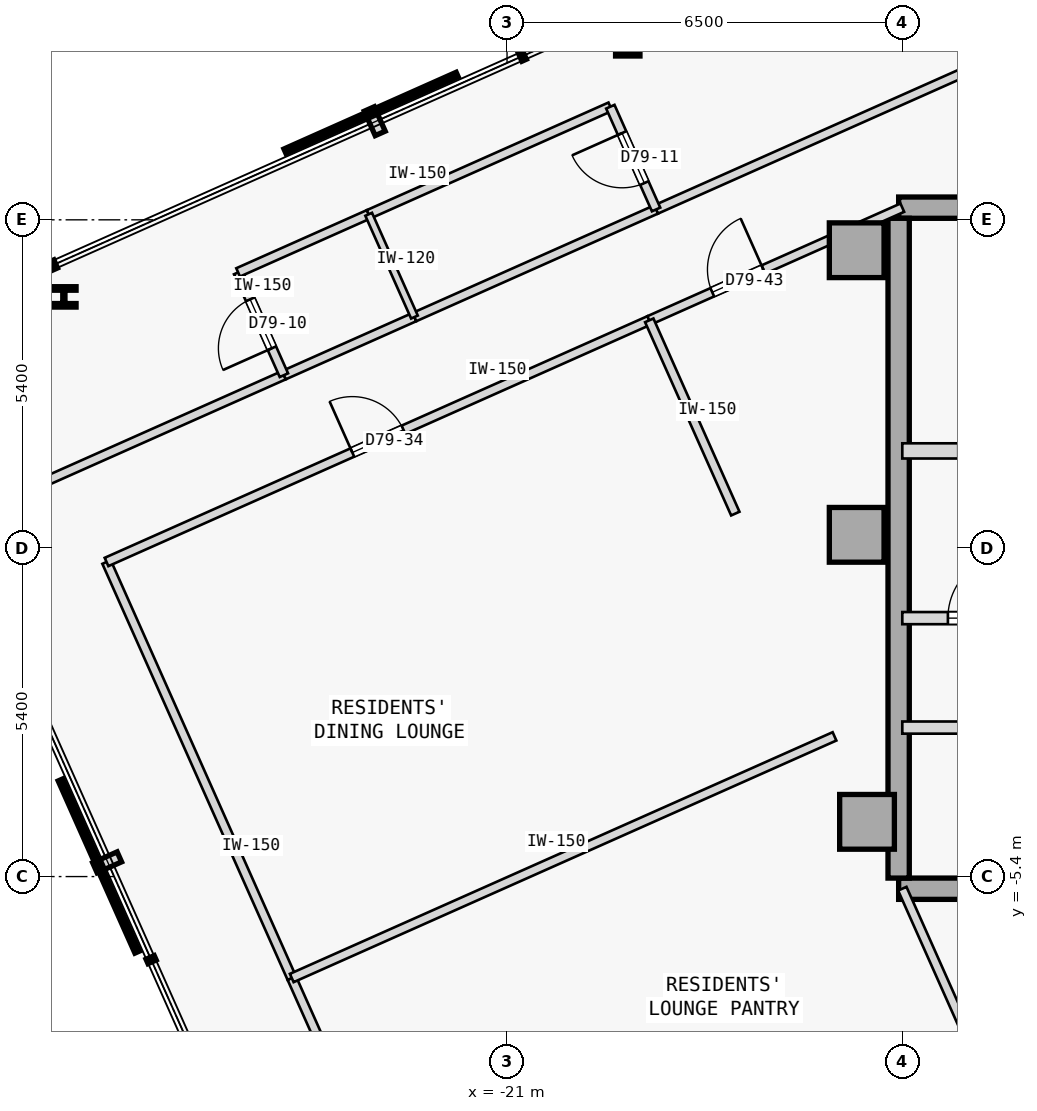
"""IFC4 building model, lengths in metres.
Left out: names, types, materials, properties, quantities, classifications, styles, units other than length and angle.
Written with IfcOpenShell. Run it as: python <this file> out.ifc"""

import sys

from ifc_helpers import new_model, si_unit, direction, frame, frame_2d, origin, origin_2d, place, context, subcontext, project, spatial, rectangle, i_section, extrude, element, fill, save


model = new_model("IFC4")
c1 = context("Model", 3, precision=1e-05, world=origin(), true_north=direction((0.0, 1.0)))
c2 = subcontext(c1, "Body", "Model", "MODEL_VIEW")
j1 = project(units=[si_unit("LENGTHUNIT", "METRE"), si_unit("PLANEANGLEUNIT", "RADIAN")], contexts=[c1])
p1 = place(None, origin())
s1 = spatial("IfcSite", under=j1, at=p1, CompositionType="ELEMENT")
p2 = place(p1, origin())
s2 = spatial("IfcBuilding", under=s1, at=p2, CompositionType="ELEMENT")
p3 = place(p2, frame((0.0, 0.0, 295.3)))
s3 = spatial("IfcBuildingStorey", under=s2, at=p3, CompositionType="ELEMENT", Elevation=295.3)
for number, where, z_axis, x_axis in (
    (1, (-15.25, 4.9, 0.0), (0.0, 0.0, 1.0), (1.0, 0.0, 0.0)),
    (2, (-15.25, 0.22, 0.0), (0.0, 0.0, 1.0), (1.0, 0.0, 0.0)),
    (3, (-15.08, -4.5, 0.0), (0.0, 0.0, 1.0), (1.0, 0.0, 0.0)),
):
    element("IfcColumn", number, at=place(p3, frame(where, z_axis=z_axis, x_axis=x_axis)), inside=s3, PredefinedType="COLUMN", context=c2, shape_type="SweptSolid", body=[
        extrude(rectangle(XDim=0.9, YDim=0.9, at=origin_2d()), origin(), (0.0, 0.0, 1.0), 3.35),
    ])
p4 = place(p3, frame((-14.56, 5.6, 0.0), z_axis=(0.0, 0.0, 1.0), x_axis=(1.0, 0.0, 0.0)))
e4 = element("IfcWall", 4, at=p4, inside=s3, PredefinedType="SHEAR", context=c2, shape_type="SweptSolid", body=[
    extrude(rectangle(XDim=11.41, YDim=0.35, at=frame_2d((5.705, 0.0))), origin(), (0.0, 0.0, 1.0), 3.125),
])
p5 = place(p3, frame((-14.56, -5.6, 0.0), z_axis=(0.0, 0.0, 1.0), x_axis=(1.0, 0.0, 0.0)))
e5 = element("IfcWall", 5, at=p5, inside=s3, PredefinedType="SHEAR", context=c2, shape_type="SweptSolid", body=[
    extrude(rectangle(XDim=10.86, YDim=0.35, at=frame_2d((5.43, 0.0))), origin(), (0.0, 0.0, 1.0), 3.125),
])
p6 = place(p3, frame((-14.56, -5.425, 0.0), z_axis=(0.0, 0.0, 1.0), x_axis=(0.0, 1.0, 0.0)))
e6 = element("IfcWall", 6, at=p6, inside=s3, PredefinedType="SHEAR", context=c2, shape_type="SweptSolid", body=[
    extrude(rectangle(XDim=10.85, YDim=0.35, at=frame_2d((5.425, 0.0))), origin(), (0.0, 0.0, 1.0), 3.125),
])
for number, where, z_axis, x_axis in (
    (7, (-19.015, 8.262, 0.0), (0.0, 0.0, 1.0), (1.0, 0.0, 0.0)),
    (8, (-28.288, 4.133, 0.0), (0.0, 0.0, 1.0), (1.0, 0.0, 0.0)),
):
    element("IfcColumn", number, at=place(p3, frame(where, z_axis=z_axis, x_axis=x_axis)), inside=s3, PredefinedType="COLUMN", context=c2, shape_type="SweptSolid", body=[
        extrude(i_section(OverallWidth=0.401, OverallDepth=0.335, WebThickness=0.036, FlangeThickness=0.058, FilletRadius=0.015, at=origin_2d()), origin(), (0.0, 0.0, 1.0), 3.35),
    ])
p7 = place(p3, frame((-14.5, 1.6, 0.0), z_axis=(0.0, 0.0, 1.0), x_axis=(1.0, 0.0, 0.0)))
e9 = element("IfcWall", 9, at=p7, inside=s3, PredefinedType="STANDARD", context=c2, shape_type="SweptSolid", body=[
    extrude(rectangle(XDim=3.6, YDim=0.25, at=frame_2d((1.8, 0.0))), origin(), (0.0, 0.0, 1.0), 3.125),
])
p8 = place(p7, frame((0.92, 0.0, 0.0)))
e10 = element("IfcOpeningElement", 10, at=p8, cuts=e9, PredefinedType="OPENING", context=c2, shape_type="SweptSolid", body=[
    extrude(rectangle(XDim=1.05, YDim=2.15, at=frame_2d((0.525, 1.075))), frame((0.0, 0.135, 0.0), z_axis=(0.0, -1.0, 0.0), x_axis=(1.0, 0.0, 0.0)), (0.0, 0.0, 1.0), 0.27),
])
p9 = place(p3, frame((-14.5, -1.15, 0.0), z_axis=(0.0, 0.0, 1.0), x_axis=(1.0, 0.0, 0.0)))
e11 = element("IfcWall", 11, at=p9, inside=s3, PredefinedType="STANDARD", context=c2, shape_type="SweptSolid", body=[
    extrude(rectangle(XDim=2.95, YDim=0.2, at=frame_2d((1.475, 0.0))), origin(), (0.0, 0.0, 1.0), 3.125),
])
p10 = place(p9, frame((0.75, 0.0, 0.0)))
e12 = element("IfcOpeningElement", 12, at=p10, cuts=e11, PredefinedType="OPENING", context=c2, shape_type="SweptSolid", body=[
    extrude(rectangle(XDim=1.05, YDim=2.18, at=frame_2d((0.525, 1.09))), frame((0.0, 0.11, 0.0), z_axis=(0.0, -1.0, 0.0), x_axis=(1.0, 0.0, 0.0)), (0.0, 0.0, 1.0), 0.22),
])
p11 = place(p3, frame((-14.5, -2.95, 0.0), z_axis=(0.0, 0.0, 1.0), x_axis=(1.0, 0.0, 0.0)))
e13 = element("IfcWall", 13, at=p11, inside=s3, PredefinedType="STANDARD", context=c2, shape_type="SweptSolid", body=[
    extrude(rectangle(XDim=10.8, YDim=0.2, at=frame_2d((5.4, 0.0))), origin(), (0.0, 0.0, 1.0), 3.125),
])
p12 = place(p11, frame((9.17, 0.0, 0.0)))
e14 = element("IfcOpeningElement", 14, at=p12, cuts=e13, PredefinedType="OPENING", context=c2, shape_type="SweptSolid", body=[
    extrude(rectangle(XDim=1.1, YDim=2.15, at=frame_2d((0.55, 1.075))), frame((0.0, 0.11, 0.0), z_axis=(0.0, -1.0, 0.0), x_axis=(1.0, 0.0, 0.0)), (0.0, 0.0, 1.0), 0.22),
])
p13 = place(p11, frame((2.33, 0.0, 0.0)))
e15 = element("IfcOpeningElement", 15, at=p13, cuts=e13, PredefinedType="OPENING", context=c2, shape_type="SweptSolid", body=[
    extrude(rectangle(XDim=0.92, YDim=2.15, at=frame_2d((0.46, 1.075))), frame((0.0, 0.11, 0.0), z_axis=(0.0, -1.0, 0.0), x_axis=(1.0, 0.0, 0.0)), (0.0, 0.0, 1.0), 0.22),
])
p14 = place(p11, frame((6.65, 0.0, 0.0)))
e16 = element("IfcOpeningElement", 16, at=p14, cuts=e13, PredefinedType="OPENING", context=c2, shape_type="SweptSolid", body=[
    extrude(rectangle(XDim=0.92, YDim=2.15, at=frame_2d((0.46, 1.075))), frame((0.0, 0.11, 0.0), z_axis=(0.0, -1.0, 0.0), x_axis=(1.0, 0.0, 0.0)), (0.0, 0.0, 1.0), 0.22),
])
p15 = place(p3, frame((-30.063, 0.444, 0.0), z_axis=(0.0, 0.0, 1.0), x_axis=(0.913545336501, 0.406736915165, 0.0)))
e17 = element("IfcWall", 17, at=p15, inside=s3, PredefinedType="PARTITIONING", context=c2, shape_type="SweptSolid", body=[
    extrude(rectangle(XDim=5.904, YDim=0.15, at=frame_2d((2.952, 0.0))), origin(), (0.0, 0.0, 1.0), 3.125),
])
p16 = place(p3, frame((-18.549, 5.57, 0.0), z_axis=(0.0, 0.0, 1.0), x_axis=(0.913545955058, 0.40673552586, 0.0)))
e18 = element("IfcWall", 18, at=p16, inside=s3, PredefinedType="PARTITIONING", context=c2, shape_type="SweptSolid", body=[
    extrude(rectangle(XDim=13.808, YDim=0.15, at=frame_2d((6.904, 0.0))), origin(), (0.0, 0.0, 1.0), 3.125),
])
p17 = place(p16, frame((6.429, 0.0, 0.0)))
e19 = element("IfcOpeningElement", 19, at=p17, cuts=e18, PredefinedType="OPENING", context=c2, shape_type="SweptSolid", body=[
    extrude(rectangle(XDim=0.95, YDim=2.15, at=frame_2d((0.475, 1.075))), frame((0.0, 0.085, 0.0), z_axis=(0.0, -1.0, 0.0), x_axis=(1.0, 0.0, 0.0)), (0.0, 0.0, 1.0), 0.17),
])
p18 = place(p3, frame((-24.67, 2.845, 0.0), z_axis=(0.0, 0.0, 1.0), x_axis=(0.913541436194, 0.406745675276, 0.0)))
e20 = element("IfcWall", 20, at=p18, inside=s3, PredefinedType="PARTITIONING", context=c2, shape_type="SweptSolid", body=[
    extrude(rectangle(XDim=2.35, YDim=0.15, at=frame_2d((1.175, 0.0))), origin(), (0.0, 0.0, 1.0), 3.125),
])
p19 = place(p3, frame((-22.523, 3.801, 0.0), z_axis=(0.0, 0.0, 1.0), x_axis=(0.913545193015, 0.406737237438, 0.0)))
e21 = element("IfcWall", 21, at=p19, inside=s3, PredefinedType="PARTITIONING", context=c2, shape_type="SweptSolid", body=[
    extrude(rectangle(XDim=4.35, YDim=0.15, at=frame_2d((2.175, 0.0))), origin(), (0.0, 0.0, 1.0), 3.125),
])
p20 = place(p3, frame((-21.942, -12.904, 0.0), z_axis=(0.0, 0.0, 1.0), x_axis=(-0.406712833395, 0.913556058023, 0.0)))
e22 = element("IfcWall", 22, at=p20, inside=s3, PredefinedType="PARTITIONING", context=c2, shape_type="SweptSolid", body=[
    extrude(rectangle(XDim=6.388, YDim=0.15, at=frame_2d((3.194, 0.0))), origin(), (0.0, 0.0, 1.0), 3.125),
])
p21 = place(p20, frame((2.734, 0.0, 0.0)))
e23 = element("IfcOpeningElement", 23, at=p21, cuts=e22, PredefinedType="OPENING", context=c2, shape_type="SweptSolid", body=[
    extrude(rectangle(XDim=0.92, YDim=2.15, at=frame_2d((0.46, 1.075))), frame((0.0, 0.085, 0.0), z_axis=(0.0, -1.0, 0.0), x_axis=(1.0, 0.0, 0.0)), (0.0, 0.0, 1.0), 0.17),
])
p22 = place(p3, frame((-24.54, -7.068, 0.0), z_axis=(0.0, 0.0, 1.0), x_axis=(-0.406758457302, 0.913535745011, 0.0)))
e24 = element("IfcWall", 24, at=p22, inside=s3, PredefinedType="PARTITIONING", context=c2, shape_type="SweptSolid", body=[
    extrude(rectangle(XDim=7.489, YDim=0.15, at=frame_2d((3.744, 0.0))), origin(), (0.0, 0.0, 1.0), 3.125),
])
p23 = place(p3, frame((-27.586, -0.227, 0.0), z_axis=(0.0, 0.0, 1.0), x_axis=(0.913542396088, 0.40674351937, 0.0)))
e25 = element("IfcWall", 25, at=p23, inside=s3, PredefinedType="PARTITIONING", context=c2, shape_type="SweptSolid", body=[
    extrude(rectangle(XDim=9.77, YDim=0.15, at=frame_2d((4.885, 0.0))), origin(), (0.0, 0.0, 1.0), 3.125),
])
p24 = place(p23, frame((4.425, 0.0, 0.0)))
e26 = element("IfcOpeningElement", 26, at=p24, cuts=e25, PredefinedType="OPENING", context=c2, shape_type="SweptSolid", body=[
    extrude(rectangle(XDim=0.92, YDim=2.15, at=frame_2d((0.46, 1.075))), frame((0.0, 0.085, 0.0), z_axis=(0.0, -1.0, 0.0), x_axis=(1.0, 0.0, 0.0)), (0.0, 0.0, 1.0), 0.17),
])
p25 = place(p3, frame((-18.661, 3.747, 0.0), z_axis=(0.0, 0.0, 1.0), x_axis=(0.913535055583, 0.40676000568, 0.0)))
e27 = element("IfcWall", 27, at=p25, inside=s3, PredefinedType="PARTITIONING", context=c2, shape_type="SweptSolid", body=[
    extrude(rectangle(XDim=4.555, YDim=0.15, at=frame_2d((2.277, 0.0))), origin(), (0.0, 0.0, 1.0), 3.125),
])
p26 = place(p25, frame((1.134, 0.0, 0.0)))
e28 = element("IfcOpeningElement", 28, at=p26, cuts=e27, PredefinedType="OPENING", context=c2, shape_type="SweptSolid", body=[
    extrude(rectangle(XDim=0.92, YDim=2.15, at=frame_2d((0.46, 1.075))), frame((0.0, 0.085, 0.0), z_axis=(0.0, -1.0, 0.0), x_axis=(1.0, 0.0, 0.0)), (0.0, 0.0, 1.0), 0.17),
])
p27 = place(p3, frame((-24.67, 2.845, 0.0), z_axis=(0.0, 0.0, 1.0), x_axis=(-0.406701600856, 0.913561058639, 0.0)))
e29 = element("IfcWall", 29, at=p27, inside=s3, PredefinedType="PARTITIONING", context=c2, shape_type="SweptSolid", body=[
    extrude(rectangle(XDim=1.85, YDim=0.15, at=frame_2d((0.925, 0.0))), origin(), (0.0, 0.0, 1.0), 3.125),
])
p28 = place(p27, frame((0.485, 0.0, 0.0)))
e30 = element("IfcOpeningElement", 30, at=p28, cuts=e29, PredefinedType="OPENING", context=c2, shape_type="SweptSolid", body=[
    extrude(rectangle(XDim=0.88, YDim=2.15, at=frame_2d((0.44, 1.075))), frame((0.0, 0.085, 0.0), z_axis=(0.0, -1.0, 0.0), x_axis=(1.0, 0.0, 0.0)), (0.0, 0.0, 1.0), 0.17),
])
p29 = place(p3, frame((-25.422, 4.535, 0.0), z_axis=(0.0, 0.0, 1.0), x_axis=(0.913541436194, 0.406745675276, 0.0)))
e31 = element("IfcWall", 31, at=p29, inside=s3, PredefinedType="PARTITIONING", context=c2, shape_type="SweptSolid", body=[
    extrude(rectangle(XDim=2.35, YDim=0.15, at=frame_2d((1.175, 0.0))), origin(), (0.0, 0.0, 1.0), 3.125),
])
p30 = place(p3, frame((-23.275, 5.491, 0.0), z_axis=(0.0, 0.0, 1.0), x_axis=(0.913545193015, 0.406737237438, 0.0)))
e32 = element("IfcWall", 32, at=p30, inside=s3, PredefinedType="PARTITIONING", context=c2, shape_type="SweptSolid", body=[
    extrude(rectangle(XDim=4.35, YDim=0.15, at=frame_2d((2.175, 0.0))), origin(), (0.0, 0.0, 1.0), 3.125),
])
p31 = place(p3, frame((-18.549, 5.57, 0.0), z_axis=(0.0, 0.0, 1.0), x_axis=(-0.406701600856, 0.913561058639, 0.0)))
e33 = element("IfcWall", 33, at=p31, inside=s3, PredefinedType="PARTITIONING", context=c2, shape_type="SweptSolid", body=[
    extrude(rectangle(XDim=1.85, YDim=0.15, at=frame_2d((0.925, 0.0))), origin(), (0.0, 0.0, 1.0), 3.125),
])
p32 = place(p31, frame((0.475, 0.0, 0.0)))
e34 = element("IfcOpeningElement", 34, at=p32, cuts=e33, PredefinedType="OPENING", context=c2, shape_type="SweptSolid", body=[
    extrude(rectangle(XDim=0.9, YDim=2.15, at=frame_2d((0.45, 1.075))), frame((0.0, 0.085, 0.0), z_axis=(0.0, -1.0, 0.0), x_axis=(1.0, 0.0, 0.0)), (0.0, 0.0, 1.0), 0.17),
])
p33 = place(p3, frame((-22.523, 3.801, 0.0), z_axis=(0.0, 0.0, 1.0), x_axis=(-0.406701600856, 0.913561058639, 0.0)))
e35 = element("IfcWall", 35, at=p33, inside=s3, PredefinedType="PARTITIONING", context=c2, shape_type="SweptSolid", body=[
    extrude(rectangle(XDim=1.85, YDim=0.12, at=frame_2d((0.925, 0.0))), origin(), (0.0, 0.0, 1.0), 3.125),
])
p34 = place(p3, frame((-24.54, -7.068, 0.0), z_axis=(0.0, 0.0, 1.0), x_axis=(0.913551681238, 0.406722664364, 0.0)))
e36 = element("IfcWall", 36, at=p34, inside=s3, PredefinedType="PARTITIONING", context=c2, shape_type="SweptSolid", body=[
    extrude(rectangle(XDim=9.77, YDim=0.15, at=frame_2d((4.885, 0.0))), origin(), (0.0, 0.0, 1.0), 3.125),
])
p35 = place(p3, frame((-13.017, -8.93, 0.0), z_axis=(0.0, 0.0, 1.0), x_axis=(-0.406722395322, 0.913551801018, 0.0)))
e37 = element("IfcWall", 37, at=p35, inside=s3, PredefinedType="PARTITIONING", context=c2, shape_type="SweptSolid", body=[
    extrude(rectangle(XDim=3.646, YDim=0.15, at=frame_2d((1.823, 0.0))), origin(), (0.0, 0.0, 1.0), 3.125),
])
p36 = place(p3, frame((-17.246, 0.569, 0.0), z_axis=(0.0, 0.0, 1.0), x_axis=(-0.40673740295, 0.913545119324, 0.0)))
e38 = element("IfcWall", 38, at=p36, inside=s3, PredefinedType="PARTITIONING", context=c2, shape_type="SweptSolid", body=[
    extrude(rectangle(XDim=3.479, YDim=0.15, at=frame_2d((1.74, 0.0))), origin(), (0.0, 0.0, 1.0), 3.125),
])
p37 = place(p10, origin())
e39 = element("IfcDoor", 39, at=p37, inside=s3, OperationType="SINGLE_SWING_RIGHT", PredefinedType="DOOR", context=c2, shape_type="SweptSolid", body=[
    extrude(rectangle(XDim=1.05, YDim=2.18, at=frame_2d((0.525, 1.09))), frame((0.0, 0.025, 0.0), z_axis=(0.0, -1.0, 0.0), x_axis=(1.0, 0.0, 0.0)), (0.0, 0.0, 1.0), 0.05),
])
fill(e12, e39)
p38 = place(p28, origin())
e40 = element("IfcDoor", 40, at=p38, inside=s3, OperationType="SINGLE_SWING_LEFT", PredefinedType="DOOR", context=c2, shape_type="SweptSolid", body=[
    extrude(rectangle(XDim=0.88, YDim=2.15, at=frame_2d((0.44, 1.075))), frame((0.0, 0.025, 0.0), z_axis=(0.0, -1.0, 0.0), x_axis=(1.0, 0.0, 0.0)), (0.0, 0.0, 1.0), 0.05),
])
fill(e30, e40)
p39 = place(p32, origin())
e41 = element("IfcDoor", 41, at=p39, inside=s3, OperationType="SINGLE_SWING_RIGHT", PredefinedType="DOOR", context=c2, shape_type="SweptSolid", body=[
    extrude(rectangle(XDim=0.9, YDim=2.15, at=frame_2d((0.45, 1.075))), frame((0.0, 0.025, 0.0), z_axis=(0.0, -1.0, 0.0), x_axis=(1.0, 0.0, 0.0)), (0.0, 0.0, 1.0), 0.05),
])
fill(e34, e41)
p40 = place(p24, origin())
e42 = element("IfcDoor", 42, at=p40, inside=s3, OperationType="SINGLE_SWING_LEFT", PredefinedType="DOOR", context=c2, shape_type="SweptSolid", body=[
    extrude(rectangle(XDim=0.92, YDim=2.15, at=frame_2d((0.46, 1.075))), frame((0.0, 0.025, 0.0), z_axis=(0.0, -1.0, 0.0), x_axis=(1.0, 0.0, 0.0)), (0.0, 0.0, 1.0), 0.05),
])
fill(e26, e42)
p41 = place(p26, origin())
e43 = element("IfcDoor", 43, at=p41, inside=s3, OperationType="SINGLE_SWING_RIGHT", PredefinedType="DOOR", context=c2, shape_type="SweptSolid", body=[
    extrude(rectangle(XDim=0.92, YDim=2.15, at=frame_2d((0.46, 1.075))), frame((0.0, 0.025, 0.0), z_axis=(0.0, -1.0, 0.0), x_axis=(1.0, 0.0, 0.0)), (0.0, 0.0, 1.0), 0.05),
])
fill(e28, e43)
save(model, sys.argv[1])
